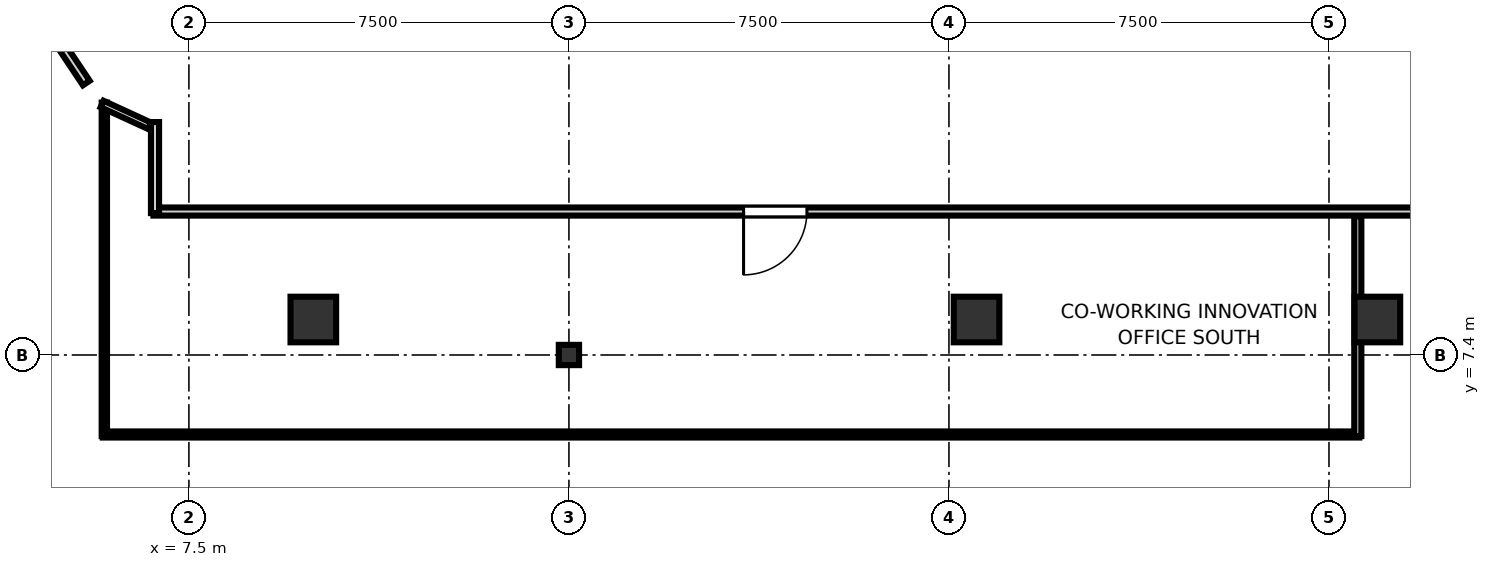
"""IFC4 building model, lengths in metres.
Left out: names, types, materials, properties, quantities, classifications, styles, units other than length and angle.
Written with IfcOpenShell. Run it as: python <this file> out.ifc"""

import sys

from ifc_helpers import new_model, si_unit, direction, frame, frame_2d, origin, origin_2d, place, context, subcontext, project, spatial, rectangle, i_section, extrude, element, fill, save


model = new_model("IFC4")
c1 = context("Model", 3, precision=1e-05, world=origin(), true_north=direction((0.0, 1.0)))
c2 = subcontext(c1, "Body", "Model", "MODEL_VIEW")
j1 = project(units=[si_unit("LENGTHUNIT", "METRE"), si_unit("PLANEANGLEUNIT", "RADIAN")], contexts=[c1])
p1 = place(None, origin())
s1 = spatial("IfcSite", under=j1, at=p1, CompositionType="ELEMENT")
p2 = place(p1, origin())
s2 = spatial("IfcBuilding", under=s1, at=p2, CompositionType="ELEMENT")
p3 = place(p2, frame((0.0, 0.0, 11.0)))
s3 = spatial("IfcBuildingStorey", under=s2, at=p3, CompositionType="ELEMENT", Elevation=11.0)
for number, where, z_axis, x_axis in (
    (1, (9.955, 8.1, 0.0), (0.0, 0.0, 1.0), (1.0, 0.0, 0.0)),
    (2, (23.045, 8.1, 0.0), (0.0, 0.0, 1.0), (1.0, 0.0, 0.0)),
    (3, (30.955, 8.1, 0.0), (0.0, 0.0, 1.0), (1.0, 0.0, 0.0)),
):
    element("IfcColumn", number, at=place(p3, frame(where, z_axis=z_axis, x_axis=x_axis)), inside=s3, PredefinedType="COLUMN", context=c2, shape_type="SweptSolid", body=[
        extrude(rectangle(XDim=0.9, YDim=0.9, at=origin_2d()), origin(), (0.0, 0.0, 1.0), 4.8),
    ])
p4 = place(p3, frame((15.0, 7.4, 0.0), z_axis=(0.0, 0.0, 1.0), x_axis=(1.0, 0.0, 0.0)))
e4 = element("IfcColumn", 4, at=p4, inside=s3, PredefinedType="COLUMN", context=c2, shape_type="SweptSolid", body=[
    extrude(i_section(OverallWidth=0.4, OverallDepth=0.4, WebThickness=0.013, FlangeThickness=0.021, at=origin_2d()), origin(), (0.0, 0.0, 1.0), 4.8),
])
p5 = place(p3, frame((1.5, 6.0, 0.0), z_axis=(0.0, 0.0, 1.0), x_axis=(0.707106781187, -0.707106781187, 0.0)))
e5 = element("IfcWall", 5, at=p5, inside=s3, PredefinedType="SOLIDWALL", context=c2, shape_type="SweptSolid", body=[
    extrude(rectangle(XDim=6.364, YDim=0.28, at=frame_2d((3.182, 0.0))), origin(), (0.0, 0.0, 1.0), 4.58),
])
p6 = place(p3, frame((67.2, 10.231, 0.0), z_axis=(0.0, 0.0, 1.0), x_axis=(-1.0, 0.0, 0.0)))
e6 = element("IfcWall", 6, at=p6, inside=s3, PredefinedType="PARTITIONING", context=c2, shape_type="SweptSolid", body=[
    extrude(rectangle(XDim=60.4, YDim=0.16, at=frame_2d((30.2, 0.0))), origin(), (0.0, 0.0, 1.0), 3.1),
])
p7 = place(p6, frame((47.503, 0.0, 0.0)))
e7 = element("IfcOpeningElement", 7, at=p7, cuts=e6, PredefinedType="OPENING", context=c2, shape_type="SweptSolid", body=[
    extrude(rectangle(XDim=1.25, YDim=2.2, at=frame_2d((0.625, 1.1))), frame((0.0, 0.09, 0.0), z_axis=(0.0, -1.0, 0.0), x_axis=(1.0, 0.0, 0.0)), (0.0, 0.0, 1.0), 0.18),
])
p8 = place(p6, frame((12.197, 0.0, 0.0)))
e8 = element("IfcOpeningElement", 8, at=p8, cuts=e6, PredefinedType="OPENING", context=c2, shape_type="SweptSolid", body=[
    extrude(rectangle(XDim=1.25, YDim=2.2, at=frame_2d((0.625, 1.1))), frame((0.0, 0.09, 0.0), z_axis=(0.0, -1.0, 0.0), x_axis=(1.0, 0.0, 0.0)), (0.0, 0.0, 1.0), 0.18),
])
p9 = place(p3, frame((6.831, 10.2, 0.0), z_axis=(0.0, 0.0, 1.0), x_axis=(0.0, 1.0, 0.0)))
e9 = element("IfcWall", 9, at=p9, inside=s3, PredefinedType="PARTITIONING", context=c2, shape_type="SweptSolid", body=[
    extrude(rectangle(XDim=1.796, YDim=0.16, at=frame_2d((0.898, 0.0))), origin(), (0.0, 0.0, 1.0), 3.1),
])
p10 = place(p3, frame((5.475, 12.767, 0.0), z_axis=(0.0, 0.0, 1.0), x_axis=(-0.555546297918, 0.831485604728, 0.0)))
e10 = element("IfcWall", 10, at=p10, inside=s3, PredefinedType="PARTITIONING", context=c2, shape_type="SweptSolid", body=[
    extrude(rectangle(XDim=1.132, YDim=0.16, at=frame_2d((0.566, 0.0))), origin(), (0.0, 0.0, 1.0), 3.1),
])
p11 = place(p3, frame((30.6, 5.831, 0.0), z_axis=(0.0, 0.0, 1.0), x_axis=(-1.0, 0.0, 0.0)))
e11 = element("IfcWall", 11, at=p11, inside=s3, PredefinedType="PARTITIONING", context=c2, shape_type="SweptSolid", body=[
    extrude(rectangle(XDim=24.8, YDim=0.12, at=frame_2d((12.4, 0.0))), origin(), (0.0, 0.0, 1.0), 3.1),
])
p12 = place(p3, frame((5.831, 5.8, 0.0), z_axis=(0.0, 0.0, 1.0), x_axis=(0.0, 1.0, 0.0)))
e12 = element("IfcWall", 12, at=p12, inside=s3, PredefinedType="PARTITIONING", context=c2, shape_type="SweptSolid", body=[
    extrude(rectangle(XDim=6.581, YDim=0.105, at=frame_2d((3.291, 0.0))), origin(), (0.0, 0.0, 1.0), 3.1),
])
p13 = place(p3, frame((5.787, 12.353, 0.0), z_axis=(0.0, 0.0, 1.0), x_axis=(0.908698668485, -0.417452667849, 0.0)))
e13 = element("IfcWall", 13, at=p13, inside=s3, PredefinedType="PARTITIONING", context=c2, shape_type="SweptSolid", body=[
    extrude(rectangle(XDim=1.032, YDim=0.14, at=frame_2d((0.516, 0.0))), origin(), (0.0, 0.0, 1.0), 3.1),
])
p14 = place(p3, frame((30.569, 10.138, 0.0), z_axis=(0.0, 0.0, 1.0), x_axis=(0.0, -1.0, 0.0)))
e14 = element("IfcWall", 14, at=p14, inside=s3, PredefinedType="PARTITIONING", context=c2, shape_type="SweptSolid", body=[
    extrude(rectangle(XDim=4.338, YDim=0.14, at=frame_2d((2.169, 0.0))), origin(), (0.0, 0.0, 1.0), 3.1),
])
p15 = place(p7, origin())
e15 = element("IfcDoor", 15, at=p15, inside=s3, OperationType="SINGLE_SWING_RIGHT", PredefinedType="DOOR", context=c2, shape_type="SweptSolid", body=[
    extrude(rectangle(XDim=1.25, YDim=2.2, at=frame_2d((0.625, 1.1))), frame((0.0, 0.025, 0.0), z_axis=(0.0, -1.0, 0.0), x_axis=(1.0, 0.0, 0.0)), (0.0, 0.0, 1.0), 0.05),
])
fill(e7, e15)
save(model, sys.argv[1])
